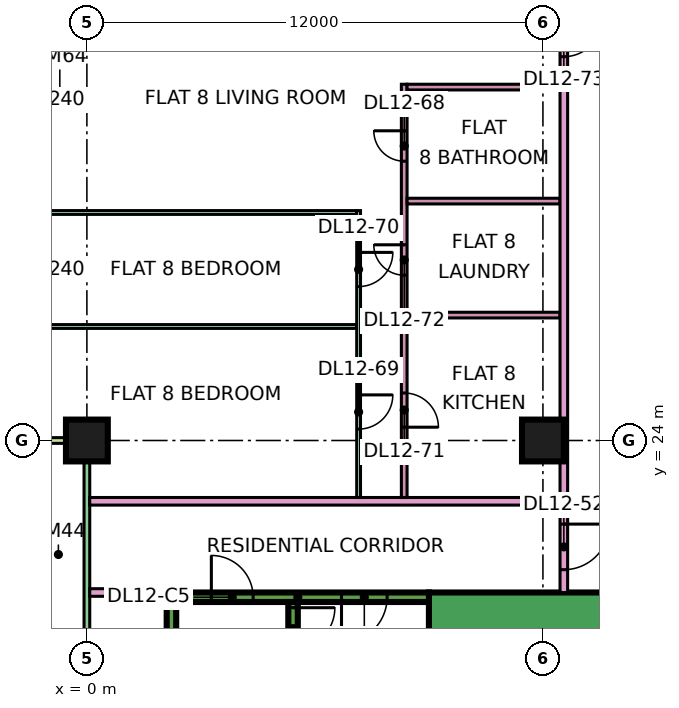
"""IFC4 building model, lengths in metres.
Left out: names, types, materials, properties, quantities, classifications, styles, units other than length and angle.
Written with IfcOpenShell. Run it as: python <this file> out.ifc"""

import sys

from ifc_helpers import new_model, si_unit, direction, frame, frame_2d, origin, origin_2d, place, context, subcontext, project, spatial, rectangle, extrude, element, fill, save


model = new_model("IFC4")
c1 = context("Model", 3, precision=1e-05, world=origin(), true_north=direction((0.0, 1.0)))
c2 = subcontext(c1, "Body", "Model", "MODEL_VIEW")
j1 = project(units=[si_unit("LENGTHUNIT", "METRE"), si_unit("PLANEANGLEUNIT", "RADIAN")], contexts=[c1])
p1 = place(None, origin())
s1 = spatial("IfcSite", under=j1, at=p1, CompositionType="ELEMENT")
p2 = place(p1, origin())
s2 = spatial("IfcBuilding", under=s1, at=p2, CompositionType="ELEMENT")
p3 = place(p2, frame((0.0, 0.0, 60.15)))
s3 = spatial("IfcBuildingStorey", under=s2, at=p3, CompositionType="ELEMENT", Elevation=60.15)
for number, where, z_axis, x_axis in (
    (1, (0.0, 24.0, 0.0), (0.0, 0.0, 1.0), (1.0, 0.0, 0.0)),
    (2, (12.0, 24.0, 0.0), (0.0, 0.0, 1.0), (1.0, 0.0, 0.0)),
):
    element("IfcColumn", number, at=place(p3, frame(where, z_axis=z_axis, x_axis=x_axis)), inside=s3, PredefinedType="COLUMN", context=c2, shape_type="SweptSolid", body=[
        extrude(rectangle(XDim=1.1, YDim=1.1, at=origin_2d()), origin(), (0.0, 0.0, 1.0), 3.75),
    ])
p4 = place(p3, frame((9.0, 19.45, 0.0), z_axis=(0.0, 0.0, 1.0), x_axis=(1.0, 0.0, 0.0)))
e3 = element("IfcWall", 3, at=p4, inside=s3, PredefinedType="SHEAR", context=c2, shape_type="SweptSolid", body=[
    extrude(rectangle(XDim=25.0, YDim=1.1, at=frame_2d((12.5, 0.0))), origin(), (0.0, 0.0, 1.0), 3.75),
])
p5 = place(p4, frame((19.1, 0.0, 0.0)))
e4 = element("IfcOpeningElement", 4, at=p5, cuts=e3, PredefinedType="OPENING", context=c2, shape_type="SweptSolid", body=[
    extrude(rectangle(XDim=1.8, YDim=2.4, at=frame_2d((0.9, 1.2))), frame((0.0, 0.56, 0.0), z_axis=(0.0, -1.0, 0.0), x_axis=(1.0, 0.0, 0.0)), (0.0, 0.0, 1.0), 1.12),
])
p6 = place(p3, frame((2.1, 19.875, 0.0), z_axis=(0.0, 0.0, 1.0), x_axis=(1.0, 0.0, 0.0)))
e5 = element("IfcWall", 5, at=p6, inside=s3, PredefinedType="SHEAR", context=c2, shape_type="SweptSolid", body=[
    extrude(rectangle(XDim=6.9, YDim=0.25, at=frame_2d((3.45, 0.0))), origin(), (0.0, 0.0, 1.0), 3.75),
])
p7 = place(p6, frame((1.175, 0.0, 0.0)))
e6 = element("IfcOpeningElement", 6, at=p7, cuts=e5, PredefinedType="OPENING", context=c2, shape_type="SweptSolid", body=[
    extrude(rectangle(XDim=1.1, YDim=2.2, at=frame_2d((0.55, 1.1))), frame((0.0, 0.135, 0.0), z_axis=(0.0, -1.0, 0.0), x_axis=(1.0, 0.0, 0.0)), (0.0, 0.0, 1.0), 0.27),
])
p8 = place(p6, frame((4.6, 0.0, 0.0)))
e7 = element("IfcOpeningElement", 7, at=p8, cuts=e5, PredefinedType="OPENING", context=c2, shape_type="SweptSolid", body=[
    extrude(rectangle(XDim=1.2, YDim=2.2, at=frame_2d((0.6, 1.1))), frame((0.0, 0.135, 0.0), z_axis=(0.0, -1.0, 0.0), x_axis=(1.0, 0.0, 0.0)), (0.0, 0.0, 1.0), 0.27),
])
p9 = place(p3, frame((2.225, 13.25, 0.0), z_axis=(0.0, 0.0, 1.0), x_axis=(0.0, 1.0, 0.0)))
e8 = element("IfcWall", 8, at=p9, inside=s3, PredefinedType="SHEAR", context=c2, shape_type="SweptSolid", body=[
    extrude(rectangle(XDim=6.5, YDim=0.25, at=frame_2d((3.25, 0.0))), origin(), (0.0, 0.0, 1.0), 3.75),
])
p10 = place(p3, frame((5.425, 13.25, 0.0), z_axis=(0.0, 0.0, 1.0), x_axis=(0.0, 1.0, 0.0)))
e9 = element("IfcWall", 9, at=p10, inside=s3, PredefinedType="SHEAR", context=c2, shape_type="SweptSolid", body=[
    extrude(rectangle(XDim=6.5, YDim=0.25, at=frame_2d((3.25, 0.0))), origin(), (0.0, 0.0, 1.0), 3.75),
])
p11 = place(p10, frame((5.25, 0.0, 0.0)))
e10 = element("IfcOpeningElement", 10, at=p11, cuts=e9, PredefinedType="OPENING", context=c2, shape_type="SweptSolid", body=[
    extrude(rectangle(XDim=1.1, YDim=2.2, at=frame_2d((0.55, 1.1))), frame((0.0, 0.135, 0.0), z_axis=(0.0, -1.0, 0.0), x_axis=(1.0, 0.0, 0.0)), (0.0, 0.0, 1.0), 0.27),
])
p12 = place(p3, frame((0.0, 23.925, 0.0), z_axis=(0.0, 0.0, 1.0), x_axis=(0.0, -1.0, 0.0)))
e11 = element("IfcWall", 11, at=p12, inside=s3, PredefinedType="SOLIDWALL", context=c2, shape_type="SweptSolid", body=[
    extrude(rectangle(XDim=11.35, YDim=0.15, at=frame_2d((5.675, 0.0))), origin(), (0.0, 0.0, 1.0), 3.35),
])
p13 = place(p12, frame((6.738, 0.0, 0.0)))
e12 = element("IfcOpeningElement", 12, at=p13, cuts=e11, PredefinedType="OPENING", context=c2, shape_type="SweptSolid", body=[
    extrude(rectangle(XDim=1.8, YDim=2.4, at=frame_2d((0.9, 1.2))), frame((0.0, 0.085, 0.0), z_axis=(0.0, -1.0, 0.0), x_axis=(1.0, 0.0, 0.0)), (0.0, 0.0, 1.0), 0.17),
])
p14 = place(p3, frame((-1.5, 24.0, 0.0), z_axis=(0.0, 0.0, 1.0), x_axis=(1.0, 0.0, 0.0)))
e13 = element("IfcWall", 13, at=p14, inside=s3, PredefinedType="SOLIDWALL", context=c2, shape_type="SweptSolid", body=[
    extrude(rectangle(XDim=1.5, YDim=0.15, at=frame_2d((0.75, 0.0))), origin(), (0.0, 0.0, 1.0), 3.35),
])
p15 = place(p3, frame((-1.351, 27.0, 0.0), z_axis=(0.0, 0.0, 1.0), x_axis=(1.0, 0.0, 0.0)))
e14 = element("IfcWall", 14, at=p15, inside=s3, PredefinedType="PARTITIONING", context=c2, shape_type="SweptSolid", body=[
    extrude(rectangle(XDim=8.451, YDim=0.1, at=frame_2d((4.226, 0.0))), origin(), (0.0, 0.0, 1.0), 3.35),
])
p16 = place(p3, frame((-1.35, 30.0, 0.0), z_axis=(0.0, 0.0, 1.0), x_axis=(1.0, 0.0, 0.0)))
e15 = element("IfcWall", 15, at=p16, inside=s3, PredefinedType="PARTITIONING", context=c2, shape_type="SweptSolid", body=[
    extrude(rectangle(XDim=8.45, YDim=0.1, at=frame_2d((4.225, 0.0))), origin(), (0.0, 0.0, 1.0), 3.35),
])
p17 = place(p3, frame((0.074, 20.0, 0.0), z_axis=(0.0, 0.0, 1.0), x_axis=(1.0, 0.0, 0.0)))
e16 = element("IfcWall", 16, at=p17, inside=s3, PredefinedType="PARTITIONING", context=c2, shape_type="SweptSolid", body=[
    extrude(rectangle(XDim=2.026, YDim=0.2, at=frame_2d((1.013, 0.0))), origin(), (0.0, 0.0, 1.0), 3.35),
])
p18 = place(p3, frame((0.074, 22.4, 0.0), z_axis=(0.0, 0.0, 1.0), x_axis=(1.0, 0.0, 0.0)))
e17 = element("IfcWall", 17, at=p18, inside=s3, PredefinedType="PARTITIONING", context=c2, shape_type="SweptSolid", body=[
    extrude(rectangle(XDim=12.376, YDim=0.2, at=frame_2d((6.188, 0.0))), origin(), (0.0, 0.0, 1.0), 3.35),
])
p19 = place(p3, frame((7.15, 22.5, 0.0), z_axis=(0.0, 0.0, 1.0), x_axis=(0.0, 1.0, 0.0)))
e18 = element("IfcWall", 18, at=p19, inside=s3, PredefinedType="PARTITIONING", context=c2, shape_type="SweptSolid", body=[
    extrude(rectangle(XDim=7.55, YDim=0.1, at=frame_2d((3.775, 0.0))), origin(), (0.0, 0.0, 1.0), 3.35),
])
p20 = place(p19, frame((1.8, 0.0, 0.0)))
e19 = element("IfcOpeningElement", 19, at=p20, cuts=e18, PredefinedType="OPENING", context=c2, shape_type="SweptSolid", body=[
    extrude(rectangle(XDim=0.9, YDim=2.1, at=frame_2d((0.45, 1.05))), frame((0.0, 0.06, 0.0), z_axis=(0.0, -1.0, 0.0), x_axis=(1.0, 0.0, 0.0)), (0.0, 0.0, 1.0), 0.12),
])
p21 = place(p19, frame((5.55, 0.0, 0.0)))
e20 = element("IfcOpeningElement", 20, at=p21, cuts=e18, PredefinedType="OPENING", context=c2, shape_type="SweptSolid", body=[
    extrude(rectangle(XDim=0.9, YDim=2.1, at=frame_2d((0.45, 1.05))), frame((0.0, 0.06, 0.0), z_axis=(0.0, -1.0, 0.0), x_axis=(1.0, 0.0, 0.0)), (0.0, 0.0, 1.0), 0.12),
])
p22 = place(p3, frame((8.35, 22.5, 0.0), z_axis=(0.0, 0.0, 1.0), x_axis=(0.0, 1.0, 0.0)))
e21 = element("IfcWall", 21, at=p22, inside=s3, PredefinedType="PARTITIONING", context=c2, shape_type="SweptSolid", body=[
    extrude(rectangle(XDim=10.875, YDim=0.15, at=frame_2d((5.438, 0.0))), origin(), (0.0, 0.0, 1.0), 3.35),
])
p23 = place(p22, frame((8.85, 0.0, 0.0)))
e22 = element("IfcOpeningElement", 22, at=p23, cuts=e21, PredefinedType="OPENING", context=c2, shape_type="SweptSolid", body=[
    extrude(rectangle(XDim=0.8, YDim=2.1, at=frame_2d((0.4, 1.05))), frame((0.0, 0.085, 0.0), z_axis=(0.0, -1.0, 0.0), x_axis=(1.0, 0.0, 0.0)), (0.0, 0.0, 1.0), 0.17),
])
p24 = place(p22, frame((1.85, 0.0, 0.0)))
e23 = element("IfcOpeningElement", 23, at=p24, cuts=e21, PredefinedType="OPENING", context=c2, shape_type="SweptSolid", body=[
    extrude(rectangle(XDim=0.9, YDim=2.1, at=frame_2d((0.45, 1.05))), frame((0.0, 0.085, 0.0), z_axis=(0.0, -1.0, 0.0), x_axis=(1.0, 0.0, 0.0)), (0.0, 0.0, 1.0), 0.17),
])
p25 = place(p22, frame((5.85, 0.0, 0.0)))
e24 = element("IfcOpeningElement", 24, at=p25, cuts=e21, PredefinedType="OPENING", context=c2, shape_type="SweptSolid", body=[
    extrude(rectangle(XDim=0.8, YDim=2.1, at=frame_2d((0.4, 1.05))), frame((0.0, 0.085, 0.0), z_axis=(0.0, -1.0, 0.0), x_axis=(1.0, 0.0, 0.0)), (0.0, 0.0, 1.0), 0.17),
])
for number, where, z_axis, x_axis in (
    (25, (8.425, 27.3, 0.0), (0.0, 0.0, 1.0), (1.0, 0.0, 0.0)),
    (26, (8.425, 30.3, 0.0), (0.0, 0.0, 1.0), (1.0, 0.0, 0.0)),
    (27, (8.425, 33.3, 0.0), (0.0, 0.0, 1.0), (1.0, 0.0, 0.0)),
):
    element("IfcWall", number, at=place(p3, frame(where, z_axis=z_axis, x_axis=x_axis)), inside=s3, PredefinedType="PARTITIONING", context=c2, shape_type="SweptSolid", body=[
        extrude(rectangle(XDim=4.025, YDim=0.15, at=frame_2d((2.012, 0.0))), origin(), (0.0, 0.0, 1.0), 3.35),
    ])
p26 = place(p3, frame((12.55, 20.0, 0.0), z_axis=(0.0, 0.0, 1.0), x_axis=(0.0, 1.0, 0.0)))
e28 = element("IfcWall", 28, at=p26, inside=s3, PredefinedType="PARTITIONING", context=c2, shape_type="SweptSolid", body=[
    extrude(rectangle(XDim=42.926, YDim=0.2, at=frame_2d((21.463, 0.0))), origin(), (0.0, 0.0, 1.0), 3.35),
])
p27 = place(p26, frame((40.65, 0.0, 0.0)))
e29 = element("IfcOpeningElement", 29, at=p27, cuts=e28, PredefinedType="OPENING", context=c2, shape_type="SweptSolid", body=[
    extrude(rectangle(XDim=1.0, YDim=2.1, at=frame_2d((0.5, 1.05))), frame((0.0, 0.11, 0.0), z_axis=(0.0, -1.0, 0.0), x_axis=(1.0, 0.0, 0.0)), (0.0, 0.0, 1.0), 0.22),
])
p28 = place(p26, frame((0.6, 0.0, 0.0)))
e30 = element("IfcOpeningElement", 30, at=p28, cuts=e28, PredefinedType="OPENING", context=c2, shape_type="SweptSolid", body=[
    extrude(rectangle(XDim=1.2, YDim=2.1, at=frame_2d((0.6, 1.05))), frame((0.0, 0.11, 0.0), z_axis=(0.0, -1.0, 0.0), x_axis=(1.0, 0.0, 0.0)), (0.0, 0.0, 1.0), 0.22),
])
p29 = place(p26, frame((14.1, 0.0, 0.0)))
e31 = element("IfcOpeningElement", 31, at=p29, cuts=e28, PredefinedType="OPENING", context=c2, shape_type="SweptSolid", body=[
    extrude(rectangle(XDim=1.0, YDim=2.1, at=frame_2d((0.5, 1.05))), frame((0.0, 0.11, 0.0), z_axis=(0.0, -1.0, 0.0), x_axis=(1.0, 0.0, 0.0)), (0.0, 0.0, 1.0), 0.22),
])
p30 = place(p11, origin())
e32 = element("IfcDoor", 32, at=p30, inside=s3, OperationType="SINGLE_SWING_RIGHT", PredefinedType="DOOR", context=c2, shape_type="SweptSolid", body=[
    extrude(rectangle(XDim=1.1, YDim=2.2, at=frame_2d((0.55, 1.1))), frame((0.0, 0.025, 0.0), z_axis=(0.0, -1.0, 0.0), x_axis=(1.0, 0.0, 0.0)), (0.0, 0.0, 1.0), 0.05),
])
fill(e10, e32)
p31 = place(p7, origin())
e33 = element("IfcDoor", 33, at=p31, inside=s3, OperationType="SINGLE_SWING_LEFT", PredefinedType="DOOR", context=c2, shape_type="SweptSolid", body=[
    extrude(rectangle(XDim=1.1, YDim=2.2, at=frame_2d((0.55, 1.1))), frame((0.0, 0.025, 0.0), z_axis=(0.0, -1.0, 0.0), x_axis=(1.0, 0.0, 0.0)), (0.0, 0.0, 1.0), 0.05),
])
fill(e6, e33)
p32 = place(p8, frame((1.2, 0.0, 0.0), z_axis=(0.0, 0.0, 1.0), x_axis=(-1.0, 0.0, 0.0)))
e34 = element("IfcDoor", 34, at=p32, inside=s3, OperationType="SINGLE_SWING_LEFT", PredefinedType="DOOR", context=c2, shape_type="SweptSolid", body=[
    extrude(rectangle(XDim=1.2, YDim=2.2, at=frame_2d((0.6, 1.1))), frame((0.0, 0.025, 0.0), z_axis=(0.0, -1.0, 0.0), x_axis=(1.0, 0.0, 0.0)), (0.0, 0.0, 1.0), 0.05),
])
fill(e7, e34)
p33 = place(p28, origin())
e35 = element("IfcDoor", 35, at=p33, inside=s3, OperationType="SINGLE_SWING_RIGHT", PredefinedType="DOOR", context=c2, shape_type="SweptSolid", body=[
    extrude(rectangle(XDim=1.2, YDim=2.1, at=frame_2d((0.6, 1.05))), frame((0.0, 0.025, 0.0), z_axis=(0.0, -1.0, 0.0), x_axis=(1.0, 0.0, 0.0)), (0.0, 0.0, 1.0), 0.05),
])
fill(e30, e35)
p34 = place(p23, frame((0.8, 0.0, 0.0), z_axis=(0.0, 0.0, 1.0), x_axis=(-1.0, 0.0, 0.0)))
e36 = element("IfcDoor", 36, at=p34, inside=s3, OperationType="SINGLE_SWING_RIGHT", PredefinedType="DOOR", context=c2, shape_type="SweptSolid", body=[
    extrude(rectangle(XDim=0.8, YDim=2.1, at=frame_2d((0.4, 1.05))), frame((0.0, 0.025, 0.0), z_axis=(0.0, -1.0, 0.0), x_axis=(1.0, 0.0, 0.0)), (0.0, 0.0, 1.0), 0.05),
])
fill(e22, e36)
p35 = place(p20, origin())
e37 = element("IfcDoor", 37, at=p35, inside=s3, OperationType="SINGLE_SWING_RIGHT", PredefinedType="DOOR", context=c2, shape_type="SweptSolid", body=[
    extrude(rectangle(XDim=0.9, YDim=2.1, at=frame_2d((0.45, 1.05))), frame((0.0, 0.025, 0.0), z_axis=(0.0, -1.0, 0.0), x_axis=(1.0, 0.0, 0.0)), (0.0, 0.0, 1.0), 0.05),
])
fill(e19, e37)
p36 = place(p21, origin())
e38 = element("IfcDoor", 38, at=p36, inside=s3, OperationType="SINGLE_SWING_RIGHT", PredefinedType="DOOR", context=c2, shape_type="SweptSolid", body=[
    extrude(rectangle(XDim=0.9, YDim=2.1, at=frame_2d((0.45, 1.05))), frame((0.0, 0.025, 0.0), z_axis=(0.0, -1.0, 0.0), x_axis=(1.0, 0.0, 0.0)), (0.0, 0.0, 1.0), 0.05),
])
fill(e20, e38)
p37 = place(p24, frame((0.9, 0.0, 0.0), z_axis=(0.0, 0.0, 1.0), x_axis=(-1.0, 0.0, 0.0)))
e39 = element("IfcDoor", 39, at=p37, inside=s3, OperationType="SINGLE_SWING_LEFT", PredefinedType="DOOR", context=c2, shape_type="SweptSolid", body=[
    extrude(rectangle(XDim=0.9, YDim=2.1, at=frame_2d((0.45, 1.05))), frame((0.0, 0.025, 0.0), z_axis=(0.0, -1.0, 0.0), x_axis=(1.0, 0.0, 0.0)), (0.0, 0.0, 1.0), 0.05),
])
fill(e23, e39)
p38 = place(p25, frame((0.8, 0.0, 0.0), z_axis=(0.0, 0.0, 1.0), x_axis=(-1.0, 0.0, 0.0)))
e40 = element("IfcDoor", 40, at=p38, inside=s3, OperationType="SINGLE_SWING_RIGHT", PredefinedType="DOOR", context=c2, shape_type="SweptSolid", body=[
    extrude(rectangle(XDim=0.8, YDim=2.1, at=frame_2d((0.4, 1.05))), frame((0.0, 0.025, 0.0), z_axis=(0.0, -1.0, 0.0), x_axis=(1.0, 0.0, 0.0)), (0.0, 0.0, 1.0), 0.05),
])
fill(e24, e40)
p39 = place(p29, origin())
e41 = element("IfcDoor", 41, at=p39, inside=s3, OperationType="SINGLE_SWING_RIGHT", PredefinedType="DOOR", context=c2, shape_type="SweptSolid", body=[
    extrude(rectangle(XDim=1.0, YDim=2.1, at=frame_2d((0.5, 1.05))), frame((0.0, 0.025, 0.0), z_axis=(0.0, -1.0, 0.0), x_axis=(1.0, 0.0, 0.0)), (0.0, 0.0, 1.0), 0.05),
])
fill(e31, e41)
save(model, sys.argv[1])
